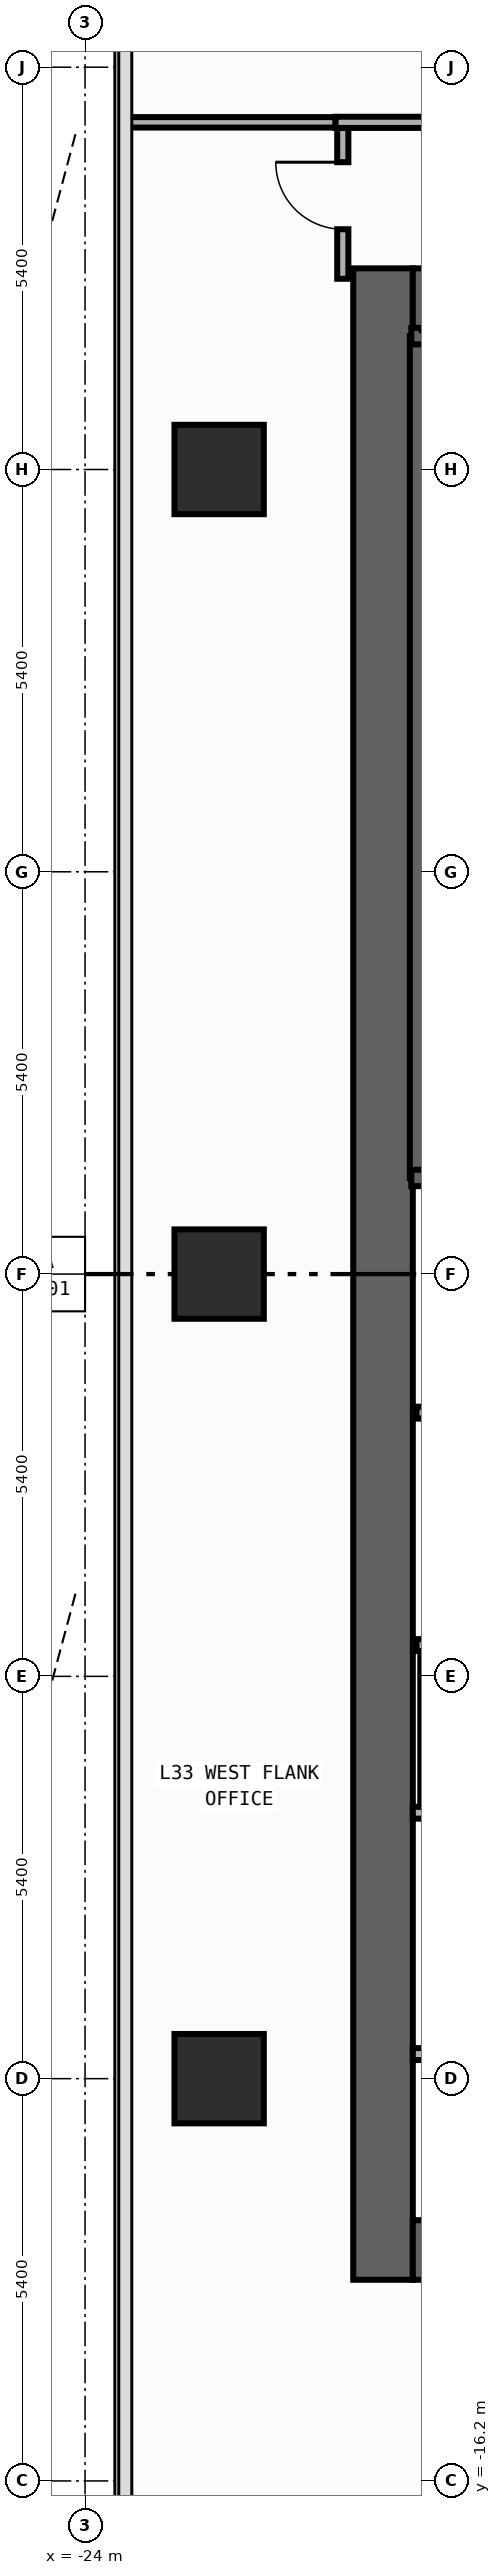
"""IFC4 building model, lengths in metres.
Left out: names, types, materials, properties, quantities, classifications, styles, units other than length and angle.
Written with IfcOpenShell. Run it as: python <this file> out.ifc"""

import sys

from ifc_helpers import new_model, si_unit, direction, frame, frame_2d, origin, origin_2d, place, context, subcontext, project, spatial, rectangle, extrude, element, fill, save


model = new_model("IFC4")
c1 = context("Model", 3, precision=1e-05, world=origin(), true_north=direction((0.0, 1.0)))
c2 = subcontext(c1, "Body", "Model", "MODEL_VIEW")
j1 = project(units=[si_unit("LENGTHUNIT", "METRE"), si_unit("PLANEANGLEUNIT", "RADIAN")], contexts=[c1])
p1 = place(None, origin())
s1 = spatial("IfcSite", under=j1, at=p1, CompositionType="ELEMENT")
p2 = place(p1, origin())
s2 = spatial("IfcBuilding", under=s1, at=p2, CompositionType="ELEMENT")
p3 = place(p2, frame((0.0, 0.0, 143.6)))
s3 = spatial("IfcBuildingStorey", under=s2, at=p3, CompositionType="ELEMENT", Elevation=143.6)
p4 = place(p3, frame((-20.0, -13.5, 0.0), z_axis=(0.0, 0.0, 1.0), x_axis=(0.0, 1.0, 0.0)))
e1 = element("IfcWall", 1, at=p4, inside=s3, PredefinedType="SHEAR", context=c2, shape_type="SweptSolid", body=[
    extrude(rectangle(XDim=27.0, YDim=0.8, at=frame_2d((13.5, 0.0))), origin(), (0.0, 0.0, 1.0), 3.94),
])
for number, where, z_axis, x_axis in (
    (2, (-19.6, -13.1, 0.0), (0.0, 0.0, 1.0), (1.0, 0.0, 0.0)),
    (3, (-19.6, 13.1, 0.0), (0.0, 0.0, 1.0), (1.0, 0.0, 0.0)),
):
    element("IfcWall", number, at=place(p3, frame(where, z_axis=z_axis, x_axis=x_axis)), inside=s3, PredefinedType="SHEAR", context=c2, shape_type="SweptSolid", body=[
        extrude(rectangle(XDim=6.8, YDim=0.8, at=frame_2d((3.4, 0.0))), origin(), (0.0, 0.0, 1.0), 3.94),
    ])
p5 = place(p3, frame((-19.53, 1.29, 0.0), z_axis=(0.0, 0.0, 1.0), x_axis=(0.0, 1.0, 0.0)))
e4 = element("IfcWall", 4, at=p5, inside=s3, PredefinedType="SHEAR", context=c2, shape_type="SweptSolid", body=[
    extrude(rectangle(XDim=11.3, YDim=0.22, at=frame_2d((5.65, 0.0))), origin(), (0.0, 0.0, 1.0), 3.94),
])
p6 = place(p3, frame((-19.62, 12.59, 0.0), z_axis=(0.0, 0.0, 1.0), x_axis=(1.0, 0.0, 0.0)))
e5 = element("IfcWall", 5, at=p6, inside=s3, PredefinedType="SHEAR", context=c2, shape_type="SweptSolid", body=[
    extrude(rectangle(XDim=3.915, YDim=0.22, at=frame_2d((1.958, 0.0))), origin(), (0.0, 0.0, 1.0), 3.94),
])
p7 = place(p3, frame((-19.62, 1.29, 0.0), z_axis=(0.0, 0.0, 1.0), x_axis=(1.0, 0.0, 0.0)))
e6 = element("IfcWall", 6, at=p7, inside=s3, PredefinedType="SHEAR", context=c2, shape_type="SweptSolid", body=[
    extrude(rectangle(XDim=3.915, YDim=0.22, at=frame_2d((1.958, 0.0))), origin(), (0.0, 0.0, 1.0), 3.94),
])
p8 = place(p7, frame((1.08, 0.0, 0.0)))
e7 = element("IfcOpeningElement", 7, at=p8, cuts=e6, PredefinedType="OPENING", context=c2, shape_type="SweptSolid", body=[
    extrude(rectangle(XDim=1.1, YDim=2.2, at=frame_2d((0.55, 1.1))), frame((0.0, 0.12, 0.0), z_axis=(0.0, -1.0, 0.0), x_axis=(1.0, 0.0, 0.0)), (0.0, 0.0, 1.0), 0.24),
])
for number, where, z_axis, x_axis in (
    (8, (-22.2, -10.8, 0.0), (0.0, 0.0, 1.0), (1.0, 0.0, 0.0)),
    (9, (-22.2, 0.0, 0.0), (0.0, 0.0, 1.0), (1.0, 0.0, 0.0)),
    (10, (-22.2, 10.8, 0.0), (0.0, 0.0, 1.0), (1.0, 0.0, 0.0)),
):
    element("IfcColumn", number, at=place(p3, frame(where, z_axis=z_axis, x_axis=x_axis)), inside=s3, PredefinedType="COLUMN", context=c2, shape_type="SweptSolid", body=[
        extrude(rectangle(XDim=1.2, YDim=1.2, at=origin_2d()), origin(), (0.0, 0.0, 1.0), 4.2),
    ])
p9 = place(p3, frame((-19.55, -1.86, 0.0), z_axis=(0.0, 0.0, 1.0), x_axis=(1.0, 0.0, 0.0)))
e11 = element("IfcWall", 11, at=p9, inside=s3, PredefinedType="STANDARD", context=c2, shape_type="SweptSolid", body=[
    extrude(rectangle(XDim=3.8, YDim=0.16, at=frame_2d((1.9, 0.0))), origin(), (0.0, 0.0, 1.0), 3.94),
])
p10 = place(p9, frame((1.18, 0.0, 0.0)))
e12 = element("IfcOpeningElement", 12, at=p10, cuts=e11, PredefinedType="OPENING", context=c2, shape_type="SweptSolid", body=[
    extrude(rectangle(XDim=1.15, YDim=2.2, at=frame_2d((0.575, 1.1))), frame((0.0, 0.09, 0.0), z_axis=(0.0, -1.0, 0.0), x_axis=(1.0, 0.0, 0.0)), (0.0, 0.0, 1.0), 0.18),
])
p11 = place(p3, frame((-19.55, -4.98, 0.0), z_axis=(0.0, 0.0, 1.0), x_axis=(1.0, 0.0, 0.0)))
e13 = element("IfcWall", 13, at=p11, inside=s3, PredefinedType="STANDARD", context=c2, shape_type="SweptSolid", body=[
    extrude(rectangle(XDim=3.8, YDim=0.16, at=frame_2d((1.9, 0.0))), origin(), (0.0, 0.0, 1.0), 3.94),
])
for number, where, z_axis, x_axis in (
    (14, (-19.6, -10.47, 0.0), (0.0, 0.0, 1.0), (1.0, 0.0, 0.0)),
    (15, (-19.6, -7.23, 0.0), (0.0, 0.0, 1.0), (1.0, 0.0, 0.0)),
):
    element("IfcWall", number, at=place(p3, frame(where, z_axis=z_axis, x_axis=x_axis)), inside=s3, PredefinedType="PARTITIONING", context=c2, shape_type="SweptSolid", body=[
        extrude(rectangle(XDim=2.29, YDim=0.16, at=frame_2d((1.145, 0.0))), origin(), (0.0, 0.0, 1.0), 3.94),
    ])
p12 = place(p3, frame((-20.54, 13.36, 0.0), z_axis=(0.0, 0.0, 1.0), x_axis=(0.0, 1.0, 0.0)))
e16 = element("IfcWall", 16, at=p12, inside=s3, PredefinedType="PARTITIONING", context=c2, shape_type="SweptSolid", body=[
    extrude(rectangle(XDim=2.025, YDim=0.15, at=frame_2d((1.012, 0.0))), origin(), (0.0, 0.0, 1.0), 3.94),
])
p13 = place(p12, frame((0.665, 0.0, 0.0)))
e17 = element("IfcOpeningElement", 17, at=p13, cuts=e16, PredefinedType="OPENING", context=c2, shape_type="SweptSolid", body=[
    extrude(rectangle(XDim=0.9, YDim=2.15, at=frame_2d((0.45, 1.075))), frame((0.0, 0.085, 0.0), z_axis=(0.0, -1.0, 0.0), x_axis=(1.0, 0.0, 0.0)), (0.0, 0.0, 1.0), 0.17),
])
p14 = place(p3, frame((-20.64, 15.46, 0.0), z_axis=(0.0, 0.0, 1.0), x_axis=(1.0, 0.0, 0.0)))
e18 = element("IfcWall", 18, at=p14, inside=s3, PredefinedType="PARTITIONING", context=c2, shape_type="SweptSolid", body=[
    extrude(rectangle(XDim=8.65, YDim=0.15, at=frame_2d((4.325, 0.0))), origin(), (0.0, 0.0, 1.0), 3.94),
])
p15 = place(p14, frame((2.871, 0.0, 0.0)))
e19 = element("IfcOpeningElement", 19, at=p15, cuts=e18, PredefinedType="OPENING", context=c2, shape_type="SweptSolid", body=[
    extrude(rectangle(XDim=0.9, YDim=2.15, at=frame_2d((0.45, 1.075))), frame((0.0, 0.085, 0.0), z_axis=(0.0, -1.0, 0.0), x_axis=(1.0, 0.0, 0.0)), (0.0, 0.0, 1.0), 0.17),
])
p16 = place(p3, frame((-23.455, 15.46, 0.0), z_axis=(0.0, 0.0, 1.0), x_axis=(1.0, 0.0, 0.0)))
e20 = element("IfcWall", 20, at=p16, inside=s3, PredefinedType="PARTITIONING", context=c2, shape_type="SweptSolid", body=[
    extrude(rectangle(XDim=2.815, YDim=0.14, at=frame_2d((1.408, 0.0))), origin(), (0.0, 0.0, 1.0), 3.94),
])
p17 = place(p3, frame((-19.45, -7.15, 0.0), z_axis=(0.0, 0.0, 1.0), x_axis=(0.0, 1.0, 0.0)))
e21 = element("IfcWall", 21, at=p17, inside=s3, PredefinedType="PARTITIONING", context=c2, shape_type="SweptSolid", body=[
    extrude(rectangle(XDim=2.09, YDim=0.1, at=frame_2d((1.045, 0.0))), origin(), (0.0, 0.0, 1.0), 3.94),
])
p18 = place(p13, origin())
e22 = element("IfcDoor", 22, at=p18, inside=s3, OperationType="SINGLE_SWING_RIGHT", PredefinedType="DOOR", context=c2, shape_type="SweptSolid", body=[
    extrude(rectangle(XDim=0.9, YDim=2.15, at=frame_2d((0.45, 1.075))), frame((0.0, 0.025, 0.0), z_axis=(0.0, -1.0, 0.0), x_axis=(1.0, 0.0, 0.0)), (0.0, 0.0, 1.0), 0.05),
])
fill(e17, e22)
save(model, sys.argv[1])
